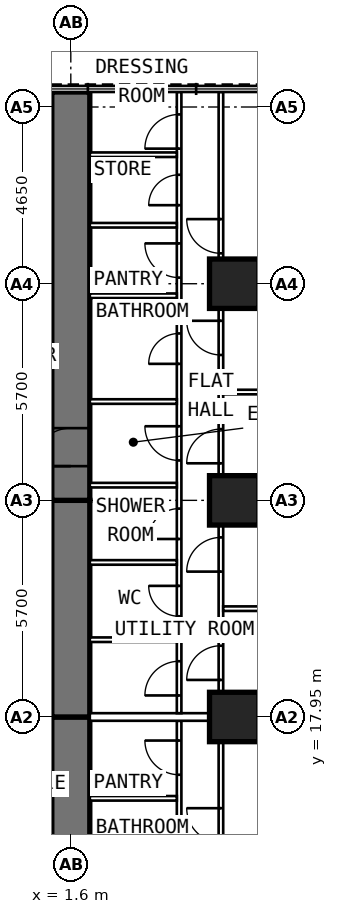
"""IFC4 building model, lengths in metres.
Left out: names, types, materials, properties, quantities, classifications, styles, units other than length and angle.
Written with IfcOpenShell. Run it as: python <this file> out.ifc"""

import sys

from ifc_helpers import new_model, si_unit, direction, frame, frame_2d, origin, origin_2d, place, context, subcontext, project, spatial, rectangle, extrude, element, fill, save


model = new_model("IFC4")
c1 = context("Model", 3, precision=1e-05, world=origin(), true_north=direction((0.0, 1.0)))
c2 = subcontext(c1, "Body", "Model", "MODEL_VIEW")
j1 = project(units=[si_unit("LENGTHUNIT", "METRE"), si_unit("PLANEANGLEUNIT", "RADIAN")], contexts=[c1])
p1 = place(None, origin())
s1 = spatial("IfcSite", under=j1, at=p1, CompositionType="ELEMENT")
p2 = place(p1, origin())
s2 = spatial("IfcBuilding", under=s1, at=p2, CompositionType="ELEMENT")
p3 = place(p2, frame((0.0, 0.0, 43.0)))
s3 = spatial("IfcBuildingStorey", under=s2, at=p3, CompositionType="ELEMENT", Elevation=43.0)
for number, where, z_axis, x_axis in (
    (1, (5.9, 17.95, 0.0), (0.0, 0.0, 1.0), (0.0, 1.0, 0.0)),
    (2, (5.9, 23.65, 0.0), (0.0, 0.0, 1.0), (0.0, 1.0, 0.0)),
    (3, (5.9, 29.35, 0.0), (0.0, 0.0, 1.0), (0.0, 1.0, 0.0)),
):
    element("IfcColumn", number, at=place(p3, frame(where, z_axis=z_axis, x_axis=x_axis)), inside=s3, PredefinedType="COLUMN", context=c2, shape_type="SweptSolid", body=[
        extrude(rectangle(XDim=1.3, YDim=1.3, at=origin_2d()), origin(), (0.0, 0.0, 1.0), 3.6),
    ])
p4 = place(p3, frame((1.6, 9.6, 0.0), z_axis=(0.0, 0.0, 1.0), x_axis=(0.0, 1.0, 0.0)))
e4 = element("IfcWall", 4, at=p4, inside=s3, PredefinedType="SHEAR", context=c2, shape_type="SweptSolid", body=[
    extrude(rectangle(XDim=8.35, YDim=1.0, at=frame_2d((4.175, 0.0))), origin(), (0.0, 0.0, 1.0), 3.6),
])
p5 = place(p4, frame((1.3, 0.0, 0.0)))
e5 = element("IfcOpeningElement", 5, at=p5, cuts=e4, PredefinedType="OPENING", context=c2, shape_type="SweptSolid", body=[
    extrude(rectangle(XDim=1.0, YDim=2.1, at=frame_2d((0.5, 1.05))), frame((0.0, 0.512, 0.0), z_axis=(0.0, -1.0, 0.0), x_axis=(1.0, 0.0, 0.0)), (0.0, 0.0, 1.0), 1.024),
])
p6 = place(p3, frame((1.6, 17.95, 0.0), z_axis=(0.0, 0.0, 1.0), x_axis=(0.0, 1.0, 0.0)))
e6 = element("IfcWall", 6, at=p6, inside=s3, PredefinedType="SHEAR", context=c2, shape_type="SweptSolid", body=[
    extrude(rectangle(XDim=5.7, YDim=1.0, at=frame_2d((2.85, 0.0))), origin(), (0.0, 0.0, 1.0), 3.6),
])
p7 = place(p3, frame((1.6, 23.65, 0.0), z_axis=(0.0, 0.0, 1.0), x_axis=(0.0, 1.0, 0.0)))
e7 = element("IfcWall", 7, at=p7, inside=s3, PredefinedType="SHEAR", context=c2, shape_type="SweptSolid", body=[
    extrude(rectangle(XDim=10.745, YDim=1.0, at=frame_2d((5.373, 0.0))), origin(), (0.0, 0.0, 1.0), 3.6),
])
p8 = place(p7, frame((0.9, 0.0, 0.0)))
e8 = element("IfcOpeningElement", 8, at=p8, cuts=e7, PredefinedType="OPENING", context=c2, shape_type="SweptSolid", body=[
    extrude(rectangle(XDim=1.0, YDim=2.1, at=frame_2d((0.5, 1.05))), frame((0.0, 0.512, 0.0), z_axis=(0.0, -1.0, 0.0), x_axis=(1.0, 0.0, 0.0)), (0.0, 0.0, 1.0), 1.024),
])
p9 = place(p3, frame((4.45, 10.1, 0.0), z_axis=(0.0, 0.0, 1.0), x_axis=(0.0, 1.0, 0.0)))
e9 = element("IfcWall", 9, at=p9, inside=s3, PredefinedType="PARTITIONING", context=c2, shape_type="SweptSolid", body=[
    extrude(rectangle(XDim=7.75, YDim=0.12, at=frame_2d((3.875, 0.0))), origin(), (0.0, 0.0, 1.0), 3.35),
])
p10 = place(p9, frame((0.75, 0.0, 0.0)))
e10 = element("IfcOpeningElement", 10, at=p10, cuts=e9, PredefinedType="OPENING", context=c2, shape_type="SweptSolid", body=[
    extrude(rectangle(XDim=0.9, YDim=2.1, at=frame_2d((0.45, 1.05))), frame((0.0, 0.072, 0.0), z_axis=(0.0, -1.0, 0.0), x_axis=(1.0, 0.0, 0.0)), (0.0, 0.0, 1.0), 0.144),
])
p11 = place(p9, frame((3.705, 0.0, 0.0)))
e11 = element("IfcOpeningElement", 11, at=p11, cuts=e9, PredefinedType="OPENING", context=c2, shape_type="SweptSolid", body=[
    extrude(rectangle(XDim=0.8, YDim=2.1, at=frame_2d((0.4, 1.05))), frame((0.0, 0.072, 0.0), z_axis=(0.0, -1.0, 0.0), x_axis=(1.0, 0.0, 0.0)), (0.0, 0.0, 1.0), 0.144),
])
p12 = place(p9, frame((6.33, 0.0, 0.0)))
e12 = element("IfcOpeningElement", 12, at=p12, cuts=e9, PredefinedType="OPENING", context=c2, shape_type="SweptSolid", body=[
    extrude(rectangle(XDim=0.9, YDim=2.1, at=frame_2d((0.45, 1.05))), frame((0.0, 0.072, 0.0), z_axis=(0.0, -1.0, 0.0), x_axis=(1.0, 0.0, 0.0)), (0.0, 0.0, 1.0), 0.144),
])
p13 = place(p3, frame((5.55, 9.691, 0.0), z_axis=(0.0, 0.0, 1.0), x_axis=(0.0, 1.0, 0.0)))
e13 = element("IfcWall", 13, at=p13, inside=s3, PredefinedType="PARTITIONING", context=c2, shape_type="SweptSolid", body=[
    extrude(rectangle(XDim=8.009, YDim=0.12, at=frame_2d((4.004, 0.0))), origin(), (0.0, 0.0, 1.0), 3.35),
])
p14 = place(p13, frame((4.959, 0.0, 0.0)))
e14 = element("IfcOpeningElement", 14, at=p14, cuts=e13, PredefinedType="OPENING", context=c2, shape_type="SweptSolid", body=[
    extrude(rectangle(XDim=0.9, YDim=2.1, at=frame_2d((0.45, 1.05))), frame((0.0, 0.072, 0.0), z_axis=(0.0, -1.0, 0.0), x_axis=(1.0, 0.0, 0.0)), (0.0, 0.0, 1.0), 0.144),
])
p15 = place(p3, frame((2.1, 15.81, 0.0), z_axis=(0.0, 0.0, 1.0), x_axis=(1.0, 0.0, 0.0)))
e15 = element("IfcWall", 15, at=p15, inside=s3, PredefinedType="PARTITIONING", context=c2, shape_type="SweptSolid", body=[
    extrude(rectangle(XDim=2.29, YDim=0.12, at=frame_2d((1.145, 0.0))), origin(), (0.0, 0.0, 1.0), 3.35),
])
p16 = place(p3, frame((4.45, 18.05, 0.0), z_axis=(0.0, 0.0, 1.0), x_axis=(0.0, 1.0, 0.0)))
e16 = element("IfcWall", 16, at=p16, inside=s3, PredefinedType="PARTITIONING", context=c2, shape_type="SweptSolid", body=[
    extrude(rectangle(XDim=16.345, YDim=0.12, at=frame_2d((8.172, 0.0))), origin(), (0.0, 0.0, 1.0), 3.35),
])
p17 = place(p16, frame((0.467, 0.0, 0.0)))
e17 = element("IfcOpeningElement", 17, at=p17, cuts=e16, PredefinedType="OPENING", context=c2, shape_type="SweptSolid", body=[
    extrude(rectangle(XDim=0.9, YDim=2.1, at=frame_2d((0.45, 1.05))), frame((0.0, 0.072, 0.0), z_axis=(0.0, -1.0, 0.0), x_axis=(1.0, 0.0, 0.0)), (0.0, 0.0, 1.0), 0.144),
])
p18 = place(p16, frame((2.55, 0.0, 0.0)))
e18 = element("IfcOpeningElement", 18, at=p18, cuts=e16, PredefinedType="OPENING", context=c2, shape_type="SweptSolid", body=[
    extrude(rectangle(XDim=0.8, YDim=2.1, at=frame_2d((0.4, 1.05))), frame((0.0, 0.072, 0.0), z_axis=(0.0, -1.0, 0.0), x_axis=(1.0, 0.0, 0.0)), (0.0, 0.0, 1.0), 0.144),
])
p19 = place(p16, frame((4.583, 0.0, 0.0)))
e19 = element("IfcOpeningElement", 19, at=p19, cuts=e16, PredefinedType="OPENING", context=c2, shape_type="SweptSolid", body=[
    extrude(rectangle(XDim=0.8, YDim=2.1, at=frame_2d((0.4, 1.05))), frame((0.0, 0.072, 0.0), z_axis=(0.0, -1.0, 0.0), x_axis=(1.0, 0.0, 0.0)), (0.0, 0.0, 1.0), 0.144),
])
p20 = place(p16, frame((6.65, 0.0, 0.0)))
e20 = element("IfcOpeningElement", 20, at=p20, cuts=e16, PredefinedType="OPENING", context=c2, shape_type="SweptSolid", body=[
    extrude(rectangle(XDim=0.9, YDim=2.1, at=frame_2d((0.45, 1.05))), frame((0.0, 0.072, 0.0), z_axis=(0.0, -1.0, 0.0), x_axis=(1.0, 0.0, 0.0)), (0.0, 0.0, 1.0), 0.144),
])
p21 = place(p16, frame((9.192, 0.0, 0.0)))
e21 = element("IfcOpeningElement", 21, at=p21, cuts=e16, PredefinedType="OPENING", context=c2, shape_type="SweptSolid", body=[
    extrude(rectangle(XDim=0.8, YDim=2.1, at=frame_2d((0.4, 1.05))), frame((0.0, 0.072, 0.0), z_axis=(0.0, -1.0, 0.0), x_axis=(1.0, 0.0, 0.0)), (0.0, 0.0, 1.0), 0.144),
])
p22 = place(p16, frame((11.461, 0.0, 0.0)))
e22 = element("IfcOpeningElement", 22, at=p22, cuts=e16, PredefinedType="OPENING", context=c2, shape_type="SweptSolid", body=[
    extrude(rectangle(XDim=0.9, YDim=2.1, at=frame_2d((0.45, 1.05))), frame((0.0, 0.072, 0.0), z_axis=(0.0, -1.0, 0.0), x_axis=(1.0, 0.0, 0.0)), (0.0, 0.0, 1.0), 0.144),
])
p23 = place(p16, frame((13.367, 0.0, 0.0)))
e23 = element("IfcOpeningElement", 23, at=p23, cuts=e16, PredefinedType="OPENING", context=c2, shape_type="SweptSolid", body=[
    extrude(rectangle(XDim=0.8, YDim=2.1, at=frame_2d((0.4, 1.05))), frame((0.0, 0.072, 0.0), z_axis=(0.0, -1.0, 0.0), x_axis=(1.0, 0.0, 0.0)), (0.0, 0.0, 1.0), 0.144),
])
p24 = place(p16, frame((14.854, 0.0, 0.0)))
e24 = element("IfcOpeningElement", 24, at=p24, cuts=e16, PredefinedType="OPENING", context=c2, shape_type="SweptSolid", body=[
    extrude(rectangle(XDim=0.9, YDim=2.1, at=frame_2d((0.45, 1.05))), frame((0.0, 0.072, 0.0), z_axis=(0.0, -1.0, 0.0), x_axis=(1.0, 0.0, 0.0)), (0.0, 0.0, 1.0), 0.144),
])
p25 = place(p3, frame((5.55, 18.05, 0.0), z_axis=(0.0, 0.0, 1.0), x_axis=(0.0, 1.0, 0.0)))
e25 = element("IfcWall", 25, at=p25, inside=s3, PredefinedType="PARTITIONING", context=c2, shape_type="SweptSolid", body=[
    extrude(rectangle(XDim=16.345, YDim=0.12, at=frame_2d((8.172, 0.0))), origin(), (0.0, 0.0, 1.0), 3.35),
])
p26 = place(p25, frame((0.875, 0.0, 0.0)))
e26 = element("IfcOpeningElement", 26, at=p26, cuts=e25, PredefinedType="OPENING", context=c2, shape_type="SweptSolid", body=[
    extrude(rectangle(XDim=0.9, YDim=2.1, at=frame_2d((0.45, 1.05))), frame((0.0, 0.072, 0.0), z_axis=(0.0, -1.0, 0.0), x_axis=(1.0, 0.0, 0.0)), (0.0, 0.0, 1.0), 0.144),
])
p27 = place(p25, frame((3.725, 0.0, 0.0)))
e27 = element("IfcOpeningElement", 27, at=p27, cuts=e25, PredefinedType="OPENING", context=c2, shape_type="SweptSolid", body=[
    extrude(rectangle(XDim=0.9, YDim=2.1, at=frame_2d((0.45, 1.05))), frame((0.0, 0.072, 0.0), z_axis=(0.0, -1.0, 0.0), x_axis=(1.0, 0.0, 0.0)), (0.0, 0.0, 1.0), 0.144),
])
p28 = place(p25, frame((6.575, 0.0, 0.0)))
e28 = element("IfcOpeningElement", 28, at=p28, cuts=e25, PredefinedType="OPENING", context=c2, shape_type="SweptSolid", body=[
    extrude(rectangle(XDim=0.9, YDim=2.1, at=frame_2d((0.45, 1.05))), frame((0.0, 0.072, 0.0), z_axis=(0.0, -1.0, 0.0), x_axis=(1.0, 0.0, 0.0)), (0.0, 0.0, 1.0), 0.144),
])
p29 = place(p25, frame((9.425, 0.0, 0.0)))
e29 = element("IfcOpeningElement", 29, at=p29, cuts=e25, PredefinedType="OPENING", context=c2, shape_type="SweptSolid", body=[
    extrude(rectangle(XDim=0.9, YDim=2.1, at=frame_2d((0.45, 1.05))), frame((0.0, 0.072, 0.0), z_axis=(0.0, -1.0, 0.0), x_axis=(1.0, 0.0, 0.0)), (0.0, 0.0, 1.0), 0.144),
])
p30 = place(p25, frame((12.1, 0.0, 0.0)))
e30 = element("IfcOpeningElement", 30, at=p30, cuts=e25, PredefinedType="OPENING", context=c2, shape_type="SweptSolid", body=[
    extrude(rectangle(XDim=0.9, YDim=2.1, at=frame_2d((0.45, 1.05))), frame((0.0, 0.072, 0.0), z_axis=(0.0, -1.0, 0.0), x_axis=(1.0, 0.0, 0.0)), (0.0, 0.0, 1.0), 0.144),
])
p31 = place(p3, frame((5.61, 20.8, 0.0), z_axis=(0.0, 0.0, 1.0), x_axis=(1.0, 0.0, 0.0)))
e31 = element("IfcWall", 31, at=p31, inside=s3, PredefinedType="PARTITIONING", context=c2, shape_type="SweptSolid", body=[
    extrude(rectangle(XDim=5.09, YDim=0.12, at=frame_2d((2.545, 0.0))), origin(), (0.0, 0.0, 1.0), 3.35),
])
p32 = place(p3, frame((5.61, 23.65, 0.0), z_axis=(0.0, 0.0, 1.0), x_axis=(1.0, 0.0, 0.0)))
e32 = element("IfcWall", 32, at=p32, inside=s3, PredefinedType="PARTITIONING", context=c2, shape_type="SweptSolid", body=[
    extrude(rectangle(XDim=5.09, YDim=0.12, at=frame_2d((2.545, 0.0))), origin(), (0.0, 0.0, 1.0), 2.45),
])
p33 = place(p3, frame((5.61, 26.5, 0.0), z_axis=(0.0, 0.0, 1.0), x_axis=(1.0, 0.0, 0.0)))
e33 = element("IfcWall", 33, at=p33, inside=s3, PredefinedType="PARTITIONING", context=c2, shape_type="SweptSolid", body=[
    extrude(rectangle(XDim=5.09, YDim=0.12, at=frame_2d((2.545, 0.0))), origin(), (0.0, 0.0, 1.0), 3.35),
])
p34 = place(p3, frame((5.61, 29.35, 0.0), z_axis=(0.0, 0.0, 1.0), x_axis=(1.0, 0.0, 0.0)))
e34 = element("IfcWall", 34, at=p34, inside=s3, PredefinedType="PARTITIONING", context=c2, shape_type="SweptSolid", body=[
    extrude(rectangle(XDim=5.09, YDim=0.12, at=frame_2d((2.545, 0.0))), origin(), (0.0, 0.0, 1.0), 2.45),
])
for number, where, z_axis, x_axis in (
    (35, (2.1, 19.983, 0.0), (0.0, 0.0, 1.0), (1.0, 0.0, 0.0)),
    (36, (2.1, 22.017, 0.0), (0.0, 0.0, 1.0), (1.0, 0.0, 0.0)),
    (37, (2.1, 24.05, 0.0), (0.0, 0.0, 1.0), (1.0, 0.0, 0.0)),
    (38, (2.1, 26.25, 0.0), (0.0, 0.0, 1.0), (1.0, 0.0, 0.0)),
):
    element("IfcWall", number, at=place(p3, frame(where, z_axis=z_axis, x_axis=x_axis)), inside=s3, PredefinedType="PARTITIONING", context=c2, shape_type="SweptSolid", body=[
        extrude(rectangle(XDim=2.29, YDim=0.12, at=frame_2d((1.145, 0.0))), origin(), (0.0, 0.0, 1.0), 3.35),
    ])
p35 = place(p3, frame((2.1, 29.033, 0.0), z_axis=(0.0, 0.0, 1.0), x_axis=(1.0, 0.0, 0.0)))
e39 = element("IfcWall", 39, at=p35, inside=s3, PredefinedType="PARTITIONING", context=c2, shape_type="SweptSolid", body=[
    extrude(rectangle(XDim=2.29, YDim=0.12, at=frame_2d((1.145, 0.0))), origin(), (0.0, 0.0, 1.0), 2.45),
])
for number, where, z_axis, x_axis in (
    (40, (2.1, 30.889, 0.0), (0.0, 0.0, 1.0), (1.0, 0.0, 0.0)),
    (41, (2.1, 32.744, 0.0), (0.0, 0.0, 1.0), (1.0, 0.0, 0.0)),
):
    element("IfcWall", number, at=place(p3, frame(where, z_axis=z_axis, x_axis=x_axis)), inside=s3, PredefinedType="PARTITIONING", context=c2, shape_type="SweptSolid", body=[
        extrude(rectangle(XDim=2.29, YDim=0.12, at=frame_2d((1.145, 0.0))), origin(), (0.0, 0.0, 1.0), 3.35),
    ])
p36 = place(p3, frame((2.1, 17.95, 0.0), z_axis=(0.0, 0.0, 1.0), x_axis=(1.0, 0.0, 0.0)))
e42 = element("IfcWall", 42, at=p36, inside=s3, PredefinedType="PARTITIONING", context=c2, shape_type="SweptSolid", body=[
    extrude(rectangle(XDim=8.6, YDim=0.2, at=frame_2d((4.3, 0.0))), origin(), (0.0, 0.0, 1.0), 2.45),
])
p37 = place(p14, origin())
e43 = element("IfcDoor", 43, at=p37, inside=s3, OperationType="SINGLE_SWING_RIGHT", PredefinedType="DOOR", context=c2, shape_type="SweptSolid", body=[
    extrude(rectangle(XDim=0.9, YDim=2.1, at=frame_2d((0.45, 1.05))), frame((0.0, 0.025, 0.0), z_axis=(0.0, -1.0, 0.0), x_axis=(1.0, 0.0, 0.0)), (0.0, 0.0, 1.0), 0.05),
])
fill(e14, e43)
p38 = place(p12, origin())
e44 = element("IfcDoor", 44, at=p38, inside=s3, OperationType="SINGLE_SWING_RIGHT", PredefinedType="DOOR", context=c2, shape_type="SweptSolid", body=[
    extrude(rectangle(XDim=0.9, YDim=2.1, at=frame_2d((0.45, 1.05))), frame((0.0, 0.025, 0.0), z_axis=(0.0, -1.0, 0.0), x_axis=(1.0, 0.0, 0.0)), (0.0, 0.0, 1.0), 0.05),
])
fill(e12, e44)
p39 = place(p8, origin())
e45 = element("IfcDoor", 45, at=p39, inside=s3, OperationType="SINGLE_SWING_LEFT", PredefinedType="DOOR", context=c2, shape_type="SweptSolid", body=[
    extrude(rectangle(XDim=1.0, YDim=2.1, at=frame_2d((0.5, 1.05))), frame((0.0, 0.25, 0.0), z_axis=(0.0, -1.0, 0.0), x_axis=(1.0, 0.0, 0.0)), (0.0, 0.0, 1.0), 0.5),
])
fill(e8, e45)
p40 = place(p26, origin())
e46 = element("IfcDoor", 46, at=p40, inside=s3, OperationType="SINGLE_SWING_LEFT", PredefinedType="DOOR", context=c2, shape_type="SweptSolid", body=[
    extrude(rectangle(XDim=0.9, YDim=2.1, at=frame_2d((0.45, 1.05))), frame((0.0, 0.025, 0.0), z_axis=(0.0, -1.0, 0.0), x_axis=(1.0, 0.0, 0.0)), (0.0, 0.0, 1.0), 0.05),
])
fill(e26, e46)
p41 = place(p27, origin())
e47 = element("IfcDoor", 47, at=p41, inside=s3, OperationType="SINGLE_SWING_LEFT", PredefinedType="DOOR", context=c2, shape_type="SweptSolid", body=[
    extrude(rectangle(XDim=0.9, YDim=2.1, at=frame_2d((0.45, 1.05))), frame((0.0, 0.025, 0.0), z_axis=(0.0, -1.0, 0.0), x_axis=(1.0, 0.0, 0.0)), (0.0, 0.0, 1.0), 0.05),
])
fill(e27, e47)
p42 = place(p28, origin())
e48 = element("IfcDoor", 48, at=p42, inside=s3, OperationType="SINGLE_SWING_LEFT", PredefinedType="DOOR", context=c2, shape_type="SweptSolid", body=[
    extrude(rectangle(XDim=0.9, YDim=2.1, at=frame_2d((0.45, 1.05))), frame((0.0, 0.025, 0.0), z_axis=(0.0, -1.0, 0.0), x_axis=(1.0, 0.0, 0.0)), (0.0, 0.0, 1.0), 0.05),
])
fill(e28, e48)
p43 = place(p29, origin())
e49 = element("IfcDoor", 49, at=p43, inside=s3, OperationType="SINGLE_SWING_RIGHT", PredefinedType="DOOR", context=c2, shape_type="SweptSolid", body=[
    extrude(rectangle(XDim=0.9, YDim=2.1, at=frame_2d((0.45, 1.05))), frame((0.0, 0.025, 0.0), z_axis=(0.0, -1.0, 0.0), x_axis=(1.0, 0.0, 0.0)), (0.0, 0.0, 1.0), 0.05),
])
fill(e29, e49)
p44 = place(p30, origin())
e50 = element("IfcDoor", 50, at=p44, inside=s3, OperationType="SINGLE_SWING_RIGHT", PredefinedType="DOOR", context=c2, shape_type="SweptSolid", body=[
    extrude(rectangle(XDim=0.9, YDim=2.1, at=frame_2d((0.45, 1.05))), frame((0.0, 0.025, 0.0), z_axis=(0.0, -1.0, 0.0), x_axis=(1.0, 0.0, 0.0)), (0.0, 0.0, 1.0), 0.05),
])
fill(e30, e50)
p45 = place(p17, origin())
e51 = element("IfcDoor", 51, at=p45, inside=s3, OperationType="SINGLE_SWING_LEFT", PredefinedType="DOOR", context=c2, shape_type="SweptSolid", body=[
    extrude(rectangle(XDim=0.9, YDim=2.1, at=frame_2d((0.45, 1.05))), frame((0.0, 0.025, 0.0), z_axis=(0.0, -1.0, 0.0), x_axis=(1.0, 0.0, 0.0)), (0.0, 0.0, 1.0), 0.05),
])
fill(e17, e51)
p46 = place(p18, origin())
e52 = element("IfcDoor", 52, at=p46, inside=s3, OperationType="SINGLE_SWING_RIGHT", PredefinedType="DOOR", context=c2, shape_type="SweptSolid", body=[
    extrude(rectangle(XDim=0.8, YDim=2.1, at=frame_2d((0.4, 1.05))), frame((0.0, 0.025, 0.0), z_axis=(0.0, -1.0, 0.0), x_axis=(1.0, 0.0, 0.0)), (0.0, 0.0, 1.0), 0.05),
])
fill(e18, e52)
p47 = place(p19, origin())
e53 = element("IfcDoor", 53, at=p47, inside=s3, OperationType="SINGLE_SWING_LEFT", PredefinedType="DOOR", context=c2, shape_type="SweptSolid", body=[
    extrude(rectangle(XDim=0.8, YDim=2.1, at=frame_2d((0.4, 1.05))), frame((0.0, 0.025, 0.0), z_axis=(0.0, -1.0, 0.0), x_axis=(1.0, 0.0, 0.0)), (0.0, 0.0, 1.0), 0.05),
])
fill(e19, e53)
p48 = place(p20, origin())
e54 = element("IfcDoor", 54, at=p48, inside=s3, OperationType="SINGLE_SWING_RIGHT", PredefinedType="DOOR", context=c2, shape_type="SweptSolid", body=[
    extrude(rectangle(XDim=0.9, YDim=2.1, at=frame_2d((0.45, 1.05))), frame((0.0, 0.025, 0.0), z_axis=(0.0, -1.0, 0.0), x_axis=(1.0, 0.0, 0.0)), (0.0, 0.0, 1.0), 0.05),
])
fill(e20, e54)
p49 = place(p21, origin())
e55 = element("IfcDoor", 55, at=p49, inside=s3, OperationType="SINGLE_SWING_LEFT", PredefinedType="DOOR", context=c2, shape_type="SweptSolid", body=[
    extrude(rectangle(XDim=0.8, YDim=2.1, at=frame_2d((0.4, 1.05))), frame((0.0, 0.025, 0.0), z_axis=(0.0, -1.0, 0.0), x_axis=(1.0, 0.0, 0.0)), (0.0, 0.0, 1.0), 0.05),
])
fill(e21, e55)
p50 = place(p22, origin())
e56 = element("IfcDoor", 56, at=p50, inside=s3, OperationType="SINGLE_SWING_RIGHT", PredefinedType="DOOR", context=c2, shape_type="SweptSolid", body=[
    extrude(rectangle(XDim=0.9, YDim=2.1, at=frame_2d((0.45, 1.05))), frame((0.0, 0.025, 0.0), z_axis=(0.0, -1.0, 0.0), x_axis=(1.0, 0.0, 0.0)), (0.0, 0.0, 1.0), 0.05),
])
fill(e22, e56)
p51 = place(p23, origin())
e57 = element("IfcDoor", 57, at=p51, inside=s3, OperationType="SINGLE_SWING_LEFT", PredefinedType="DOOR", context=c2, shape_type="SweptSolid", body=[
    extrude(rectangle(XDim=0.8, YDim=2.1, at=frame_2d((0.4, 1.05))), frame((0.0, 0.025, 0.0), z_axis=(0.0, -1.0, 0.0), x_axis=(1.0, 0.0, 0.0)), (0.0, 0.0, 1.0), 0.05),
])
fill(e23, e57)
p52 = place(p24, origin())
e58 = element("IfcDoor", 58, at=p52, inside=s3, OperationType="SINGLE_SWING_LEFT", PredefinedType="DOOR", context=c2, shape_type="SweptSolid", body=[
    extrude(rectangle(XDim=0.9, YDim=2.1, at=frame_2d((0.45, 1.05))), frame((0.0, 0.025, 0.0), z_axis=(0.0, -1.0, 0.0), x_axis=(1.0, 0.0, 0.0)), (0.0, 0.0, 1.0), 0.05),
])
fill(e24, e58)
save(model, sys.argv[1])
